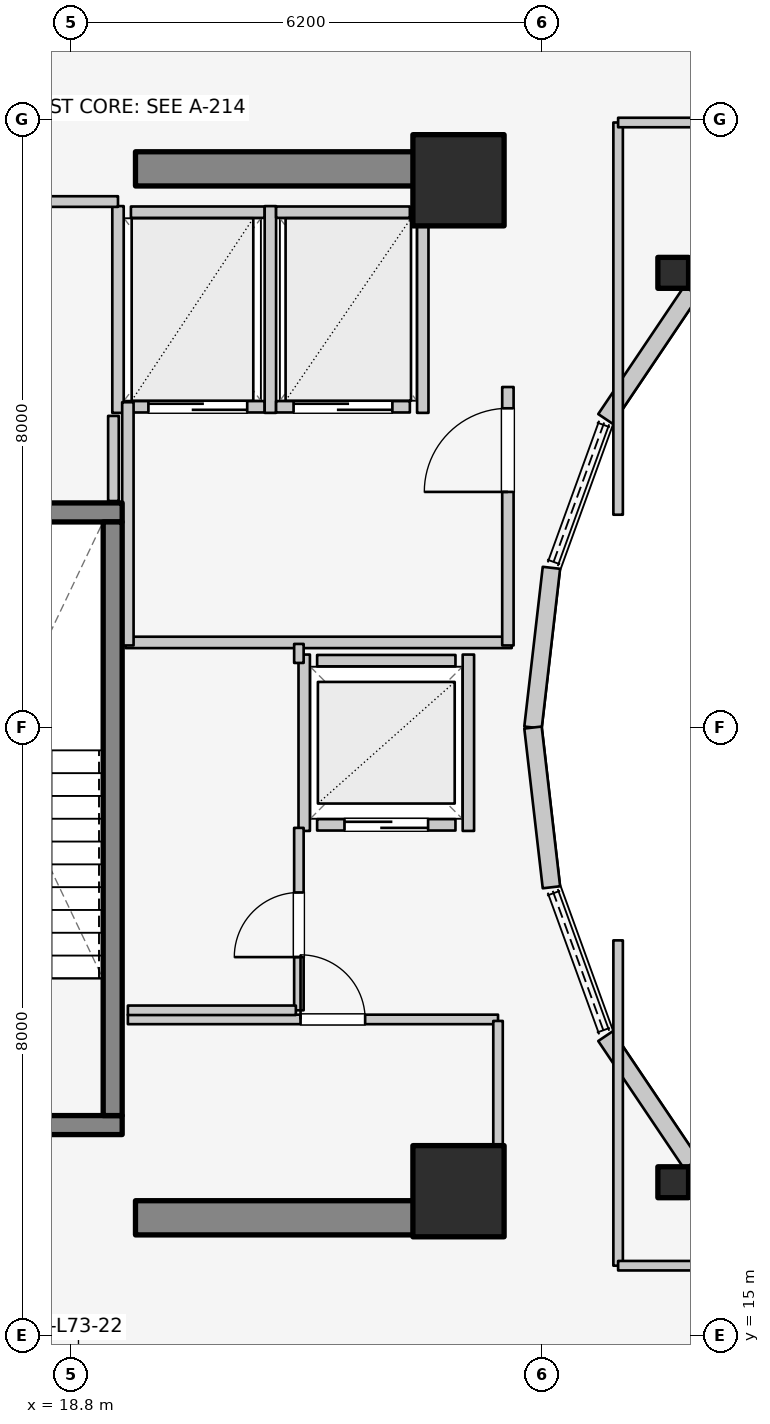
"""IFC4 building model, lengths in metres.
Left out: names, types, materials, properties, quantities, classifications, styles, units other than length and angle.
Written with IfcOpenShell. Run it as: python <this file> out.ifc"""

import sys

from ifc_helpers import new_model, si_unit, direction, frame, frame_2d, origin, origin_2d, place, context, subcontext, project, spatial, rectangle, i_section, extrude, element, fill, save


model = new_model("IFC4")
c1 = context("Model", 3, precision=1e-05, world=origin(), true_north=direction((0.0, 1.0)))
c2 = subcontext(c1, "Body", "Model", "MODEL_VIEW")
j1 = project(units=[si_unit("LENGTHUNIT", "METRE"), si_unit("PLANEANGLEUNIT", "RADIAN")], contexts=[c1])
p1 = place(None, origin())
s1 = spatial("IfcSite", under=j1, at=p1, CompositionType="ELEMENT")
p2 = place(p1, origin())
s2 = spatial("IfcBuilding", under=s1, at=p2, CompositionType="ELEMENT")
p3 = place(p2, frame((0.0, 0.0, 238.8)))
s3 = spatial("IfcBuildingStorey", under=s2, at=p3, CompositionType="ELEMENT", Elevation=238.8)
for number, where, z_axis, x_axis in (
    (1, (19.65, 16.55, 0.0), (0.0, 0.0, 1.0), (1.0, 0.0, 0.0)),
    (2, (19.65, 30.35, 0.0), (0.0, 0.0, 1.0), (1.0, 0.0, 0.0)),
):
    element("IfcWall", number, at=place(p3, frame(where, z_axis=z_axis, x_axis=x_axis)), inside=s3, PredefinedType="SHEAR", context=c2, shape_type="SweptSolid", body=[
        extrude(rectangle(XDim=4.5, YDim=0.45, at=frame_2d((2.25, 0.0))), origin(), (0.0, 0.0, 1.0), 3.6),
    ])
p4 = place(p3, frame((16.105, 17.77, 0.0), z_axis=(0.0, 0.0, 1.0), x_axis=(1.0, 0.0, 0.0)))
e3 = element("IfcWall", 3, at=p4, inside=s3, PredefinedType="SOLIDWALL", context=c2, shape_type="SweptSolid", body=[
    extrude(rectangle(XDim=3.37, YDim=0.25, at=frame_2d((1.685, 0.0))), origin(), (0.0, 0.0, 1.0), 3.6),
])
p5 = place(p4, frame((1.135, 0.0, 0.0)))
e4 = element("IfcOpeningElement", 4, at=p5, cuts=e3, PredefinedType="OPENING", context=c2, shape_type="SweptSolid", body=[
    extrude(rectangle(XDim=1.1, YDim=2.1, at=frame_2d((0.55, 1.05))), frame((0.0, 0.135, 0.0), z_axis=(0.0, -1.0, 0.0), x_axis=(1.0, 0.0, 0.0)), (0.0, 0.0, 1.0), 0.27),
])
p6 = place(p3, frame((16.105, 25.83, 0.0), z_axis=(0.0, 0.0, 1.0), x_axis=(1.0, 0.0, 0.0)))
e5 = element("IfcWall", 5, at=p6, inside=s3, PredefinedType="SOLIDWALL", context=c2, shape_type="SweptSolid", body=[
    extrude(rectangle(XDim=3.37, YDim=0.25, at=frame_2d((1.685, 0.0))), origin(), (0.0, 0.0, 1.0), 3.6),
])
p7 = place(p3, frame((19.35, 17.895, 0.0), z_axis=(0.0, 0.0, 1.0), x_axis=(0.0, 1.0, 0.0)))
e6 = element("IfcWall", 6, at=p7, inside=s3, PredefinedType="SOLIDWALL", context=c2, shape_type="SweptSolid", body=[
    extrude(rectangle(XDim=7.81, YDim=0.25, at=frame_2d((3.905, 0.0))), origin(), (0.0, 0.0, 1.0), 3.6),
])
for number, where, z_axis, x_axis in (
    (7, (23.9, 16.9, 0.0), (0.0, 0.0, 1.0), (1.0, 0.0, 0.0)),
    (8, (23.9, 30.2, 0.0), (0.0, 0.0, 1.0), (1.0, 0.0, 0.0)),
):
    element("IfcColumn", number, at=place(p3, frame(where, z_axis=z_axis, x_axis=x_axis)), inside=s3, PredefinedType="COLUMN", context=c2, shape_type="SweptSolid", body=[
        extrude(rectangle(XDim=1.2, YDim=1.2, at=origin_2d()), origin(), (0.0, 0.0, 1.0), 3.6),
    ])
for number, where, z_axis, x_axis in (
    (9, (26.725, 28.982, 0.0), (0.0, 0.0, 1.0), (1.0, 0.0, 0.0)),
    (10, (26.725, 17.018, 0.0), (0.0, 0.0, 1.0), (1.0, 0.0, 0.0)),
):
    element("IfcColumn", number, at=place(p3, frame(where, z_axis=z_axis, x_axis=x_axis)), inside=s3, PredefinedType="COLUMN", context=c2, shape_type="SweptSolid", body=[
        extrude(i_section(OverallWidth=0.404, OverallDepth=0.407, WebThickness=0.027, FlangeThickness=0.044, FilletRadius=0.025, at=origin_2d()), origin(), (0.0, 0.0, 1.0), 3.6),
    ])
p8 = place(p3, frame((28.44, 30.032, 0.0), z_axis=(0.0, 0.0, 1.0), x_axis=(-0.752576694707, -0.658504607869, 0.0)))
e11 = element("IfcWall", 11, at=p8, inside=s3, PredefinedType="STANDARD", context=c2, shape_type="SweptSolid", body=[
    extrude(rectangle(XDim=1.959, YDim=0.23, at=frame_2d((0.98, 0.0))), origin(), (0.0, 0.0, 1.0), 2.6),
])
p9 = place(p3, frame((26.965, 28.742, 0.0), z_axis=(0.0, 0.0, 1.0), x_axis=(-0.558197800898, -0.829707909492, 0.0)))
e12 = element("IfcWall", 12, at=p9, inside=s3, PredefinedType="STANDARD", context=c2, shape_type="SweptSolid", body=[
    extrude(rectangle(XDim=2.027, YDim=0.23, at=frame_2d((1.013, 0.0))), origin(), (0.0, 0.0, 1.0), 2.6),
])
for number, where, z_axis, x_axis in (
    (13, (25.123, 25.102, 0.0), (0.0, 0.0, 1.0), (-0.115, -0.993, 0.0)),
    (14, (24.88, 23.0, 0.0), (0.0, 0.0, 1.0), (0.115, -0.993, 0.0)),
):
    element("IfcWall", number, at=place(p3, frame(where, z_axis=z_axis, x_axis=x_axis)), inside=s3, PredefinedType="STANDARD", context=c2, shape_type="SweptSolid", body=[
        extrude(rectangle(XDim=2.115, YDim=0.23, at=frame_2d((1.058, 0.0))), origin(), (0.0, 0.0, 1.0), 3.28),
    ])
p10 = place(p3, frame((25.834, 18.94, 0.0), z_axis=(0.0, 0.0, 1.0), x_axis=(0.558197800898, -0.829707909492, 0.0)))
e15 = element("IfcWall", 15, at=p10, inside=s3, PredefinedType="STANDARD", context=c2, shape_type="SweptSolid", body=[
    extrude(rectangle(XDim=2.027, YDim=0.23, at=frame_2d((1.013, 0.0))), origin(), (0.0, 0.0, 1.0), 2.6),
])
p11 = place(p3, frame((26.965, 17.258, 0.0), z_axis=(0.0, 0.0, 1.0), x_axis=(0.752576694707, -0.658504607869, 0.0)))
e16 = element("IfcWall", 16, at=p11, inside=s3, PredefinedType="STANDARD", context=c2, shape_type="SweptSolid", body=[
    extrude(rectangle(XDim=1.959, YDim=0.23, at=frame_2d((0.98, 0.0))), origin(), (0.0, 0.0, 1.0), 2.6),
])
p12 = place(p3, frame((22.04, 21.72, 0.0), z_axis=(0.0, 0.0, 1.0), x_axis=(1.0, 0.0, 0.0)))
e17 = element("IfcWall", 17, at=p12, inside=s3, PredefinedType="SOLIDWALL", context=c2, shape_type="SweptSolid", body=[
    extrude(rectangle(XDim=1.82, YDim=0.15, at=frame_2d((0.91, 0.0))), origin(), (0.0, 0.0, 1.0), 2.62),
])
p13 = place(p12, frame((0.36, 0.0, 0.0)))
e18 = element("IfcOpeningElement", 18, at=p13, cuts=e17, PredefinedType="OPENING", context=c2, shape_type="SweptSolid", body=[
    extrude(rectangle(XDim=1.1, YDim=2.1, at=frame_2d((0.55, 1.05))), frame((0.0, 0.085, 0.0), z_axis=(0.0, -1.0, 0.0), x_axis=(1.0, 0.0, 0.0)), (0.0, 0.0, 1.0), 0.17),
])
p14 = place(p3, frame((22.04, 23.88, 0.0), z_axis=(0.0, 0.0, 1.0), x_axis=(1.0, 0.0, 0.0)))
e19 = element("IfcWall", 19, at=p14, inside=s3, PredefinedType="SOLIDWALL", context=c2, shape_type="SweptSolid", body=[
    extrude(rectangle(XDim=1.82, YDim=0.15, at=frame_2d((0.91, 0.0))), origin(), (0.0, 0.0, 1.0), 2.62),
])
p15 = place(p3, frame((21.87, 21.64, 0.0), z_axis=(0.0, 0.0, 1.0), x_axis=(0.0, 1.0, 0.0)))
e20 = element("IfcWall", 20, at=p15, inside=s3, PredefinedType="SOLIDWALL", context=c2, shape_type="SweptSolid", body=[
    extrude(rectangle(XDim=2.32, YDim=0.15, at=frame_2d((1.16, 0.0))), origin(), (0.0, 0.0, 1.0), 3.295),
])
p16 = place(p3, frame((24.03, 21.64, 0.0), z_axis=(0.0, 0.0, 1.0), x_axis=(0.0, 1.0, 0.0)))
e21 = element("IfcWall", 21, at=p16, inside=s3, PredefinedType="SOLIDWALL", context=c2, shape_type="SweptSolid", body=[
    extrude(rectangle(XDim=2.32, YDim=0.15, at=frame_2d((1.16, 0.0))), origin(), (0.0, 0.0, 1.0), 2.62),
])
p17 = place(p3, frame((19.59, 27.22, 0.0), z_axis=(0.0, 0.0, 1.0), x_axis=(1.0, 0.0, 0.0)))
e22 = element("IfcWall", 22, at=p17, inside=s3, PredefinedType="SOLIDWALL", context=c2, shape_type="SweptSolid", body=[
    extrude(rectangle(XDim=1.76, YDim=0.15, at=frame_2d((0.88, 0.0))), origin(), (0.0, 0.0, 1.0), 3.295),
])
p18 = place(p17, frame((0.23, 0.0, 0.0)))
e23 = element("IfcOpeningElement", 23, at=p18, cuts=e22, PredefinedType="OPENING", context=c2, shape_type="SweptSolid", body=[
    extrude(rectangle(XDim=1.3, YDim=2.1, at=frame_2d((0.65, 1.05))), frame((0.0, 0.085, 0.0), z_axis=(0.0, -1.0, 0.0), x_axis=(1.0, 0.0, 0.0)), (0.0, 0.0, 1.0), 0.17),
])
p19 = place(p3, frame((19.59, 29.78, 0.0), z_axis=(0.0, 0.0, 1.0), x_axis=(1.0, 0.0, 0.0)))
e24 = element("IfcWall", 24, at=p19, inside=s3, PredefinedType="SOLIDWALL", context=c2, shape_type="SweptSolid", body=[
    extrude(rectangle(XDim=1.76, YDim=0.15, at=frame_2d((0.88, 0.0))), origin(), (0.0, 0.0, 1.0), 3.295),
])
for number, where, z_axis, x_axis in (
    (25, (19.42, 27.14, 0.0), (0.0, 0.0, 1.0), (0.0, 1.0, 0.0)),
    (26, (21.425, 27.14, 0.0), (0.0, 0.0, 1.0), (0.0, 1.0, 0.0)),
):
    element("IfcWall", number, at=place(p3, frame(where, z_axis=z_axis, x_axis=x_axis)), inside=s3, PredefinedType="SOLIDWALL", context=c2, shape_type="SweptSolid", body=[
        extrude(rectangle(XDim=2.72, YDim=0.15, at=frame_2d((1.36, 0.0))), origin(), (0.0, 0.0, 1.0), 3.295),
    ])
p20 = place(p3, frame((21.5, 27.22, 0.0), z_axis=(0.0, 0.0, 1.0), x_axis=(1.0, 0.0, 0.0)))
e27 = element("IfcWall", 27, at=p20, inside=s3, PredefinedType="SOLIDWALL", context=c2, shape_type="SweptSolid", body=[
    extrude(rectangle(XDim=1.76, YDim=0.15, at=frame_2d((0.88, 0.0))), origin(), (0.0, 0.0, 1.0), 3.295),
])
p21 = place(p20, frame((0.23, 0.0, 0.0)))
e28 = element("IfcOpeningElement", 28, at=p21, cuts=e27, PredefinedType="OPENING", context=c2, shape_type="SweptSolid", body=[
    extrude(rectangle(XDim=1.3, YDim=2.1, at=frame_2d((0.65, 1.05))), frame((0.0, 0.085, 0.0), z_axis=(0.0, -1.0, 0.0), x_axis=(1.0, 0.0, 0.0)), (0.0, 0.0, 1.0), 0.17),
])
p22 = place(p3, frame((21.5, 29.78, 0.0), z_axis=(0.0, 0.0, 1.0), x_axis=(1.0, 0.0, 0.0)))
e29 = element("IfcWall", 29, at=p22, inside=s3, PredefinedType="SOLIDWALL", context=c2, shape_type="SweptSolid", body=[
    extrude(rectangle(XDim=1.76, YDim=0.15, at=frame_2d((0.88, 0.0))), origin(), (0.0, 0.0, 1.0), 3.295),
])
p23 = place(p3, frame((23.43, 27.14, 0.0), z_axis=(0.0, 0.0, 1.0), x_axis=(0.0, 1.0, 0.0)))
e30 = element("IfcWall", 30, at=p23, inside=s3, PredefinedType="SOLIDWALL", context=c2, shape_type="SweptSolid", body=[
    extrude(rectangle(XDim=2.72, YDim=0.15, at=frame_2d((1.36, 0.0))), origin(), (0.0, 0.0, 1.0), 3.295),
])
p24 = place(p3, frame((19.52, 24.12, 0.0), z_axis=(0.0, 0.0, 1.0), x_axis=(1.0, 0.0, 0.0)))
e31 = element("IfcWall", 31, at=p24, inside=s3, PredefinedType="PARTITIONING", context=c2, shape_type="SweptSolid", body=[
    extrude(rectangle(XDim=5.08, YDim=0.15, at=frame_2d((2.54, 0.0))), origin(), (0.0, 0.0, 1.0), 2.62),
])
p25 = place(p3, frame((19.55, 24.08, 0.0), z_axis=(0.0, 0.0, 1.0), x_axis=(0.0, 1.0, 0.0)))
e32 = element("IfcWall", 32, at=p25, inside=s3, PredefinedType="PARTITIONING", context=c2, shape_type="SweptSolid", body=[
    extrude(rectangle(XDim=3.2, YDim=0.15, at=frame_2d((1.6, 0.0))), origin(), (0.0, 0.0, 1.0), 3.295),
])
p26 = place(p3, frame((24.55, 24.08, 0.0), z_axis=(0.0, 0.0, 1.0), x_axis=(0.0, 1.0, 0.0)))
e33 = element("IfcWall", 33, at=p26, inside=s3, PredefinedType="PARTITIONING", context=c2, shape_type="SweptSolid", body=[
    extrude(rectangle(XDim=3.4, YDim=0.15, at=frame_2d((1.7, 0.0))), origin(), (0.0, 0.0, 1.0), 3.295),
])
p27 = place(p26, frame((2.02, 0.0, 0.0)))
e34 = element("IfcOpeningElement", 34, at=p27, cuts=e33, PredefinedType="OPENING", context=c2, shape_type="SweptSolid", body=[
    extrude(rectangle(XDim=1.1, YDim=2.1, at=frame_2d((0.55, 1.05))), frame((0.0, 0.085, 0.0), z_axis=(0.0, -1.0, 0.0), x_axis=(1.0, 0.0, 0.0)), (0.0, 0.0, 1.0), 0.17),
])
p28 = place(p3, frame((19.55, 19.16, 0.0), z_axis=(0.0, 0.0, 1.0), x_axis=(1.0, 0.0, 0.0)))
e35 = element("IfcWall", 35, at=p28, inside=s3, PredefinedType="PARTITIONING", context=c2, shape_type="SweptSolid", body=[
    extrude(rectangle(XDim=4.87, YDim=0.125, at=frame_2d((2.435, 0.0))), origin(), (0.0, 0.0, 1.0), 2.62),
])
p29 = place(p28, frame((2.272, 0.0, 0.0)))
e36 = element("IfcOpeningElement", 36, at=p29, cuts=e35, PredefinedType="OPENING", context=c2, shape_type="SweptSolid", body=[
    extrude(rectangle(XDim=0.85, YDim=2.05, at=frame_2d((0.425, 1.025))), frame((0.0, 0.073, 0.0), z_axis=(0.0, -1.0, 0.0), x_axis=(1.0, 0.0, 0.0)), (0.0, 0.0, 1.0), 0.145),
])
p30 = place(p3, frame((24.42, 17.1, 0.0), z_axis=(0.0, 0.0, 1.0), x_axis=(0.0, 1.0, 0.0)))
e37 = element("IfcWall", 37, at=p30, inside=s3, PredefinedType="PARTITIONING", context=c2, shape_type="SweptSolid", body=[
    extrude(rectangle(XDim=2.04, YDim=0.125, at=frame_2d((1.02, 0.0))), origin(), (0.0, 0.0, 1.0), 2.672),
])
p31 = place(p3, frame((21.8, 19.28, 0.0), z_axis=(0.0, 0.0, 1.0), x_axis=(0.0, 1.0, 0.0)))
e38 = element("IfcWall", 38, at=p31, inside=s3, PredefinedType="PARTITIONING", context=c2, shape_type="SweptSolid", body=[
    extrude(rectangle(XDim=2.4, YDim=0.125, at=frame_2d((1.2, 0.0))), origin(), (0.0, 0.0, 1.0), 3.295),
])
p32 = place(p31, frame((0.7, 0.0, 0.0)))
e39 = element("IfcOpeningElement", 39, at=p32, cuts=e38, PredefinedType="OPENING", context=c2, shape_type="SweptSolid", body=[
    extrude(rectangle(XDim=0.85, YDim=2.05, at=frame_2d((0.425, 1.025))), frame((0.0, 0.073, 0.0), z_axis=(0.0, -1.0, 0.0), x_axis=(1.0, 0.0, 0.0)), (0.0, 0.0, 1.0), 0.145),
])
p33 = place(p3, frame((21.8, 23.85, 0.0), z_axis=(0.0, 0.0, 1.0), x_axis=(0.0, 1.0, 0.0)))
e40 = element("IfcWall", 40, at=p33, inside=s3, PredefinedType="PARTITIONING", context=c2, shape_type="SweptSolid", body=[
    extrude(rectangle(XDim=0.25, YDim=0.125, at=frame_2d((0.125, 0.0))), origin(), (0.0, 0.0, 1.0), 3.295),
])
p34 = place(p3, frame((19.55, 19.28, 0.0), z_axis=(0.0, 0.0, 1.0), x_axis=(1.0, 0.0, 0.0)))
e41 = element("IfcWall", 41, at=p34, inside=s3, PredefinedType="PARTITIONING", context=c2, shape_type="SweptSolid", body=[
    extrude(rectangle(XDim=2.21, YDim=0.125, at=frame_2d((1.105, 0.0))), origin(), (0.0, 0.0, 1.0), 2.62),
])
p35 = place(p3, frame((16.12, 29.92, 0.0), z_axis=(0.0, 0.0, 1.0), x_axis=(1.0, 0.0, 0.0)))
e42 = element("IfcWall", 42, at=p35, inside=s3, PredefinedType="PLUMBINGWALL", context=c2, shape_type="SweptSolid", body=[
    extrude(rectangle(XDim=3.3, YDim=0.14, at=frame_2d((1.65, 0.0))), origin(), (0.0, 0.0, 1.0), 3.295),
])
p36 = place(p35, frame((1.399, 0.0, 0.0)))
e43 = element("IfcOpeningElement", 43, at=p36, cuts=e42, PredefinedType="OPENING", context=c2, shape_type="SweptSolid", body=[
    extrude(rectangle(XDim=0.85, YDim=2.05, at=frame_2d((0.425, 1.025))), frame((0.0, 0.08, 0.0), z_axis=(0.0, -1.0, 0.0), x_axis=(1.0, 0.0, 0.0)), (0.0, 0.0, 1.0), 0.16),
])
p37 = place(p3, frame((19.36, 25.98, 0.0), z_axis=(0.0, 0.0, 1.0), x_axis=(0.0, 1.0, 0.0)))
e44 = element("IfcWall", 44, at=p37, inside=s3, PredefinedType="PLUMBINGWALL", context=c2, shape_type="SweptSolid", body=[
    extrude(rectangle(XDim=1.12, YDim=0.14, at=frame_2d((0.56, 0.0))), origin(), (0.0, 0.0, 1.0), 3.295),
])
p38 = place(p3, frame((28.45, 30.015, 0.0), z_axis=(0.0, 0.0, 1.0), x_axis=(-0.523992004803, 0.851723182086, 0.0)))
e45 = element("IfcWall", 45, at=p38, inside=s3, PredefinedType="PARTITIONING", context=c2, shape_type="SweptSolid", body=[
    extrude(rectangle(XDim=3.101, YDim=0.125, at=frame_2d((1.551, 0.0))), origin(), (0.0, 0.0, 1.0), 2.672),
])
p39 = place(p3, frame((26.0, 25.8, 0.0), z_axis=(0.0, 0.0, 1.0), x_axis=(0.0, 1.0, 0.0)))
e46 = element("IfcWall", 46, at=p39, inside=s3, PredefinedType="PARTITIONING", context=c2, shape_type="SweptSolid", body=[
    extrude(rectangle(XDim=5.16, YDim=0.125, at=frame_2d((2.58, 0.0))), origin(), (0.0, 0.0, 1.0), 2.672),
])
p40 = place(p3, frame((26.0, 30.96, 0.0), z_axis=(0.0, 0.0, 1.0), x_axis=(1.0, 0.0, 0.0)))
e47 = element("IfcWall", 47, at=p40, inside=s3, PredefinedType="PARTITIONING", context=c2, shape_type="SweptSolid", body=[
    extrude(rectangle(XDim=2.6, YDim=0.125, at=frame_2d((1.3, 0.0))), origin(), (0.0, 0.0, 1.0), 2.816),
])
p41 = place(p3, frame((26.0, 15.92, 0.0), z_axis=(0.0, 0.0, 1.0), x_axis=(0.0, 1.0, 0.0)))
e48 = element("IfcWall", 48, at=p41, inside=s3, PredefinedType="PARTITIONING", context=c2, shape_type="SweptSolid", body=[
    extrude(rectangle(XDim=4.28, YDim=0.125, at=frame_2d((2.14, 0.0))), origin(), (0.0, 0.0, 1.0), 2.672),
])
p42 = place(p3, frame((26.0, 15.92, 0.0), z_axis=(0.0, 0.0, 1.0), x_axis=(1.0, 0.0, 0.0)))
e49 = element("IfcWall", 49, at=p42, inside=s3, PredefinedType="PARTITIONING", context=c2, shape_type="SweptSolid", body=[
    extrude(rectangle(XDim=2.6, YDim=0.125, at=frame_2d((1.3, 0.0))), origin(), (0.0, 0.0, 1.0), 2.672),
])
p43 = place(p13, origin())
e50 = element("IfcDoor", 50, at=p43, inside=s3, OperationType="DOUBLE_DOOR_SLIDING", PredefinedType="DOOR", context=c2, shape_type="SweptSolid", body=[
    extrude(rectangle(XDim=1.1, YDim=2.1, at=frame_2d((0.55, 1.05))), frame((0.0, 0.025, 0.0), z_axis=(0.0, -1.0, 0.0), x_axis=(1.0, 0.0, 0.0)), (0.0, 0.0, 1.0), 0.05),
])
fill(e18, e50)
p44 = place(p18, origin())
e51 = element("IfcDoor", 51, at=p44, inside=s3, OperationType="DOUBLE_DOOR_SLIDING", PredefinedType="DOOR", context=c2, shape_type="SweptSolid", body=[
    extrude(rectangle(XDim=1.3, YDim=2.1, at=frame_2d((0.65, 1.05))), frame((0.0, 0.025, 0.0), z_axis=(0.0, -1.0, 0.0), x_axis=(1.0, 0.0, 0.0)), (0.0, 0.0, 1.0), 0.05),
])
fill(e23, e51)
p45 = place(p21, origin())
e52 = element("IfcDoor", 52, at=p45, inside=s3, OperationType="DOUBLE_DOOR_SLIDING", PredefinedType="DOOR", context=c2, shape_type="SweptSolid", body=[
    extrude(rectangle(XDim=1.3, YDim=2.1, at=frame_2d((0.65, 1.05))), frame((0.0, 0.025, 0.0), z_axis=(0.0, -1.0, 0.0), x_axis=(1.0, 0.0, 0.0)), (0.0, 0.0, 1.0), 0.05),
])
fill(e28, e52)
p46 = place(p27, origin())
e53 = element("IfcDoor", 53, at=p46, inside=s3, OperationType="SINGLE_SWING_LEFT", PredefinedType="DOOR", context=c2, shape_type="SweptSolid", body=[
    extrude(rectangle(XDim=1.1, YDim=2.1, at=frame_2d((0.55, 1.05))), frame((0.0, 0.025, 0.0), z_axis=(0.0, -1.0, 0.0), x_axis=(1.0, 0.0, 0.0)), (0.0, 0.0, 1.0), 0.05),
])
fill(e34, e53)
p47 = place(p29, origin())
e54 = element("IfcDoor", 54, at=p47, inside=s3, OperationType="SINGLE_SWING_LEFT", PredefinedType="DOOR", context=c2, shape_type="SweptSolid", body=[
    extrude(rectangle(XDim=0.85, YDim=2.05, at=frame_2d((0.425, 1.025))), frame((0.0, 0.025, 0.0), z_axis=(0.0, -1.0, 0.0), x_axis=(1.0, 0.0, 0.0)), (0.0, 0.0, 1.0), 0.05),
])
fill(e36, e54)
p48 = place(p32, origin())
e55 = element("IfcDoor", 55, at=p48, inside=s3, OperationType="SINGLE_SWING_LEFT", PredefinedType="DOOR", context=c2, shape_type="SweptSolid", body=[
    extrude(rectangle(XDim=0.85, YDim=2.05, at=frame_2d((0.425, 1.025))), frame((0.0, 0.025, 0.0), z_axis=(0.0, -1.0, 0.0), x_axis=(1.0, 0.0, 0.0)), (0.0, 0.0, 1.0), 0.05),
])
fill(e39, e55)
save(model, sys.argv[1])
